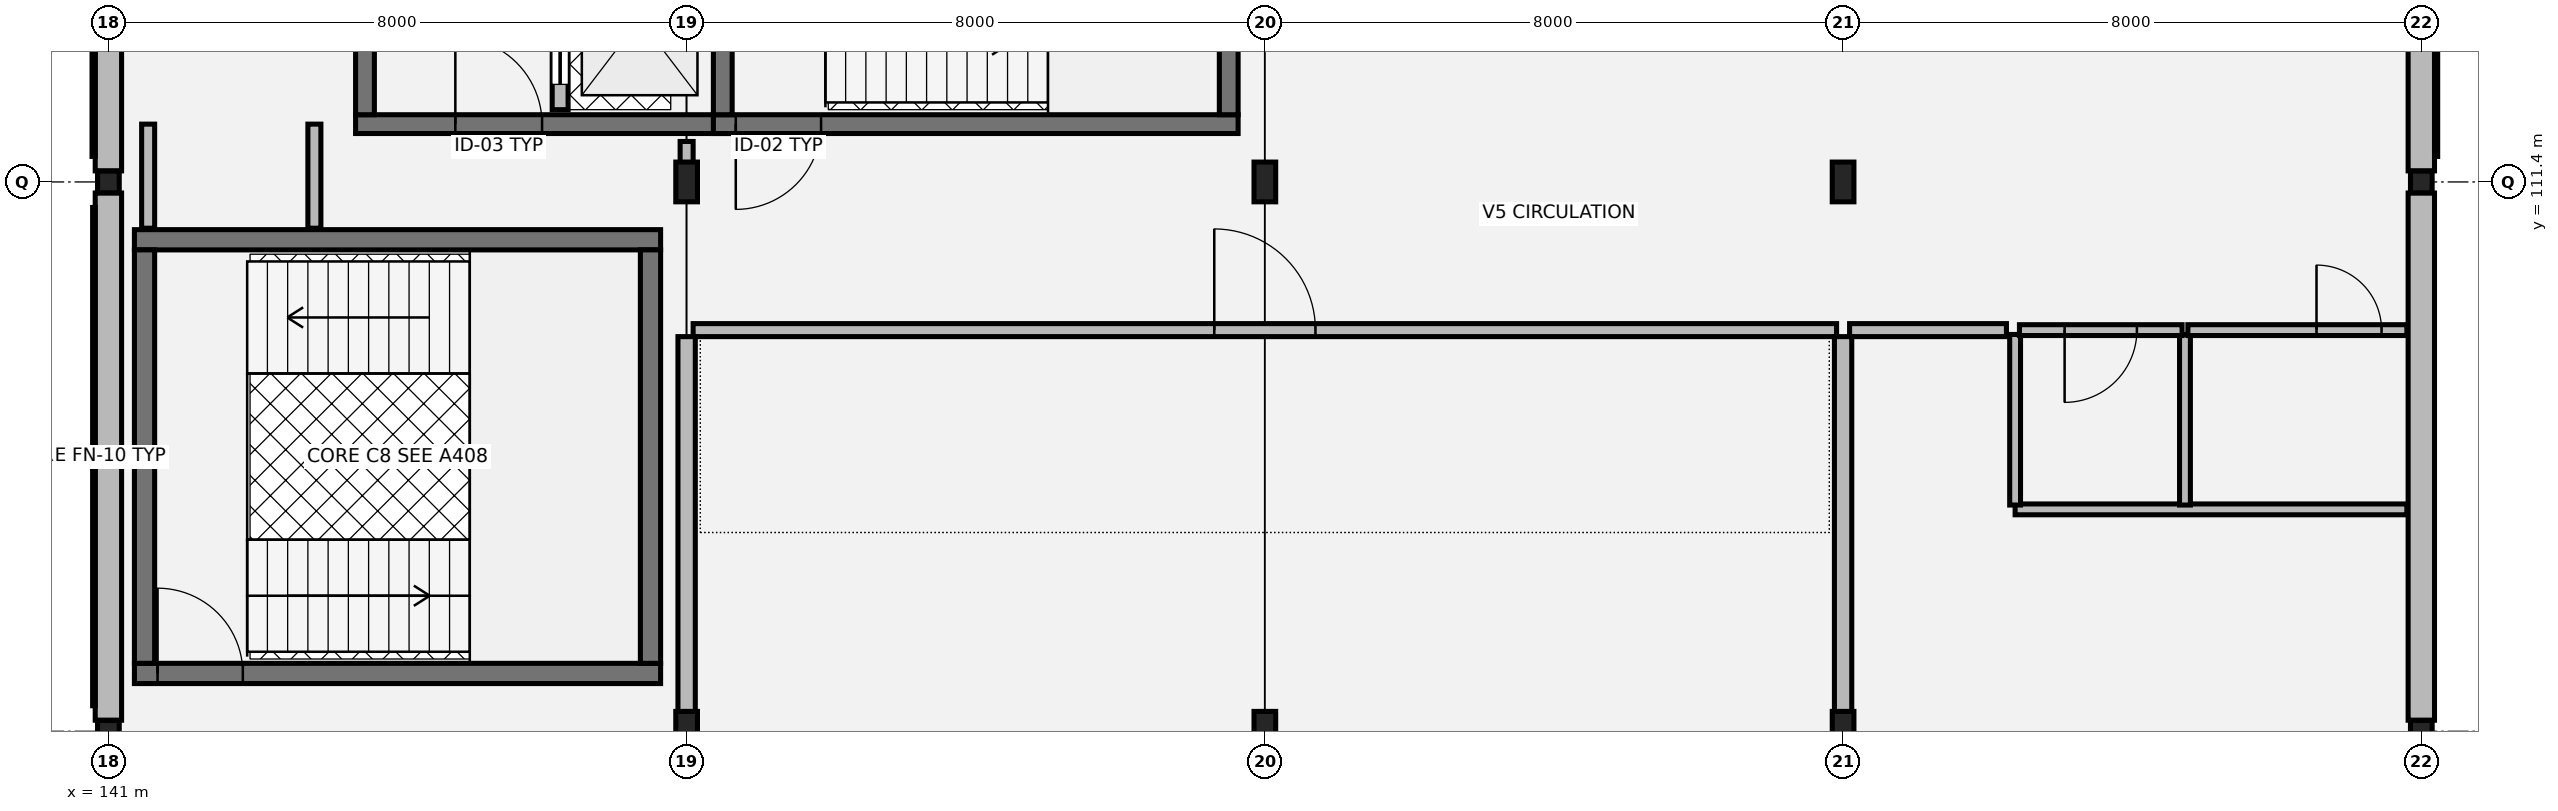
"""IFC4 building model, lengths in metres.
Left out: names, types, materials, properties, quantities, classifications, styles, units other than length and angle.
Written with IfcOpenShell. Run it as: python <this file> out.ifc"""

import sys

from ifc_helpers import new_model, si_unit, direction, frame, frame_2d, origin, origin_2d, place, context, subcontext, project, spatial, rectangle, hollow_rectangle, i_section, extrude, element, fill, save


model = new_model("IFC4")
c1 = context("Model", 3, precision=1e-05, world=origin(), true_north=direction((0.0, 1.0)))
c2 = subcontext(c1, "Body", "Model", "MODEL_VIEW")
j1 = project(units=[si_unit("LENGTHUNIT", "METRE"), si_unit("PLANEANGLEUNIT", "RADIAN")], contexts=[c1])
p1 = place(None, origin())
s1 = spatial("IfcSite", under=j1, at=p1, CompositionType="ELEMENT")
p2 = place(p1, origin())
s2 = spatial("IfcBuilding", under=s1, at=p2, CompositionType="ELEMENT")
p3 = place(p2, frame((0.0, 0.0, 5.1)))
s3 = spatial("IfcBuildingStorey", under=s2, at=p3, CompositionType="ELEMENT", Elevation=5.1)
for number, where, z_axis, x_axis in (
    (1, (141.0, 103.8, 0.0), (0.0, 0.0, 1.0), (1.0, 0.0, 0.0)),
    (2, (141.0, 111.4, 0.0), (0.0, 0.0, 1.0), (1.0, 0.0, 0.0)),
):
    element("IfcColumn", number, at=place(p3, frame(where, z_axis=z_axis, x_axis=x_axis)), inside=s3, PredefinedType="COLUMN", context=c2, shape_type="SweptSolid", body=[
        extrude(hollow_rectangle(XDim=0.3, YDim=0.3, WallThickness=0.012, at=origin_2d()), origin(), (0.0, 0.0, 1.0), 4.055),
    ])
for number, where, z_axis, x_axis in (
    (3, (149.0, 103.8, 0.0), (0.0, 0.0, 1.0), (1.0, 0.0, 0.0)),
    (4, (149.0, 111.4, 0.0), (0.0, 0.0, 1.0), (1.0, 0.0, 0.0)),
    (5, (157.0, 103.8, 0.0), (0.0, 0.0, 1.0), (1.0, 0.0, 0.0)),
    (6, (157.0, 111.4, 0.0), (0.0, 0.0, 1.0), (1.0, 0.0, 0.0)),
    (7, (165.0, 103.8, 0.0), (0.0, 0.0, 1.0), (1.0, 0.0, 0.0)),
    (8, (165.0, 111.4, 0.0), (0.0, 0.0, 1.0), (1.0, 0.0, 0.0)),
):
    element("IfcColumn", number, at=place(p3, frame(where, z_axis=z_axis, x_axis=x_axis)), inside=s3, PredefinedType="COLUMN", context=c2, shape_type="SweptSolid", body=[
        extrude(i_section(OverallWidth=0.3, OverallDepth=0.55, WebThickness=0.015, FlangeThickness=0.029, at=origin_2d()), origin(), (0.0, 0.0, 1.0), 4.055),
    ])
for number, where, z_axis, x_axis in (
    (9, (173.0, 103.8, 0.0), (0.0, 0.0, 1.0), (1.0, 0.0, 0.0)),
    (10, (173.0, 111.4, 0.0), (0.0, 0.0, 1.0), (1.0, 0.0, 0.0)),
):
    element("IfcColumn", number, at=place(p3, frame(where, z_axis=z_axis, x_axis=x_axis)), inside=s3, PredefinedType="COLUMN", context=c2, shape_type="SweptSolid", body=[
        extrude(hollow_rectangle(XDim=0.3, YDim=0.3, WallThickness=0.012, at=origin_2d()), origin(), (0.0, 0.0, 1.0), 4.055),
    ])
p4 = place(p3, frame((173.0, 103.953, 0.0), z_axis=(0.0, 0.0, 1.0), x_axis=(0.0, 1.0, 0.0)))
e11 = element("IfcWall", 11, at=p4, inside=s3, PredefinedType="SOLIDWALL", context=c2, shape_type="SweptSolid", body=[
    extrude(rectangle(XDim=7.294, YDim=0.365, at=frame_2d((3.647, 0.0))), origin(), (0.0, 0.0, 1.0), 3.48),
])
p5 = place(p3, frame((173.0, 111.553, 0.0), z_axis=(0.0, 0.0, 1.0), x_axis=(0.0, 1.0, 0.0)))
e12 = element("IfcWall", 12, at=p5, inside=s3, PredefinedType="SOLIDWALL", context=c2, shape_type="SweptSolid", body=[
    extrude(rectangle(XDim=7.294, YDim=0.365, at=frame_2d((3.647, 0.0))), origin(), (0.0, 0.0, 1.0), 3.48),
])
p6 = place(p5, frame((2.272, 0.0, 0.8)))
e13 = element("IfcOpeningElement", 13, at=p6, cuts=e12, PredefinedType="OPENING", context=c2, shape_type="SweptSolid", body=[
    extrude(rectangle(XDim=1.05, YDim=2.05, at=frame_2d((0.525, 1.025))), frame((0.0, 0.192, 0.0), z_axis=(0.0, -1.0, 0.0), x_axis=(1.0, 0.0, 0.0)), (0.0, 0.0, 1.0), 0.385),
])
p7 = place(p5, frame((3.972, 0.0, 0.8)))
e14 = element("IfcOpeningElement", 14, at=p7, cuts=e12, PredefinedType="OPENING", context=c2, shape_type="SweptSolid", body=[
    extrude(rectangle(XDim=1.05, YDim=2.05, at=frame_2d((0.525, 1.025))), frame((0.0, 0.192, 0.0), z_axis=(0.0, -1.0, 0.0), x_axis=(1.0, 0.0, 0.0)), (0.0, 0.0, 1.0), 0.385),
])
p8 = place(p3, frame((141.0, 118.847, 0.0), z_axis=(0.0, 0.0, 1.0), x_axis=(0.0, -1.0, 0.0)))
e15 = element("IfcWall", 15, at=p8, inside=s3, PredefinedType="SOLIDWALL", context=c2, shape_type="SweptSolid", body=[
    extrude(rectangle(XDim=7.294, YDim=0.365, at=frame_2d((3.647, 0.0))), origin(), (0.0, 0.0, 1.0), 3.48),
])
p9 = place(p8, frame((2.272, 0.0, 0.8)))
e16 = element("IfcOpeningElement", 16, at=p9, cuts=e15, PredefinedType="OPENING", context=c2, shape_type="SweptSolid", body=[
    extrude(rectangle(XDim=1.05, YDim=2.05, at=frame_2d((0.525, 1.025))), frame((0.0, 0.192, 0.0), z_axis=(0.0, -1.0, 0.0), x_axis=(1.0, 0.0, 0.0)), (0.0, 0.0, 1.0), 0.385),
])
p10 = place(p8, frame((3.972, 0.0, 0.8)))
e17 = element("IfcOpeningElement", 17, at=p10, cuts=e15, PredefinedType="OPENING", context=c2, shape_type="SweptSolid", body=[
    extrude(rectangle(XDim=1.05, YDim=2.05, at=frame_2d((0.525, 1.025))), frame((0.0, 0.192, 0.0), z_axis=(0.0, -1.0, 0.0), x_axis=(1.0, 0.0, 0.0)), (0.0, 0.0, 1.0), 0.385),
])
p11 = place(p3, frame((141.0, 111.247, 0.0), z_axis=(0.0, 0.0, 1.0), x_axis=(0.0, -1.0, 0.0)))
e18 = element("IfcWall", 18, at=p11, inside=s3, PredefinedType="SOLIDWALL", context=c2, shape_type="SweptSolid", body=[
    extrude(rectangle(XDim=7.294, YDim=0.365, at=frame_2d((3.647, 0.0))), origin(), (0.0, 0.0, 1.0), 3.48),
])
p12 = place(p3, frame((144.42, 112.2, 0.0), z_axis=(0.0, 0.0, 1.0), x_axis=(1.0, 0.0, 0.0)))
e19 = element("IfcWall", 19, at=p12, inside=s3, PredefinedType="SHEAR", context=c2, shape_type="SweptSolid", body=[
    extrude(rectangle(XDim=5.21, YDim=0.26, at=frame_2d((2.605, 0.0))), origin(), (0.0, 0.0, 1.0), 3.845),
])
p13 = place(p12, frame((1.38, 0.0, 0.0)))
e20 = element("IfcOpeningElement", 20, at=p13, cuts=e19, PredefinedType="OPENING", context=c2, shape_type="SweptSolid", body=[
    extrude(rectangle(XDim=1.2, YDim=2.16, at=frame_2d((0.6, 1.08))), frame((0.0, 0.14, 0.0), z_axis=(0.0, -1.0, 0.0), x_axis=(1.0, 0.0, 0.0)), (0.0, 0.0, 1.0), 0.28),
])
p14 = place(p3, frame((144.55, 118.07, 0.0), z_axis=(0.0, 0.0, 1.0), x_axis=(0.0, -1.0, 0.0)))
e21 = element("IfcWall", 21, at=p14, inside=s3, PredefinedType="SHEAR", context=c2, shape_type="SweptSolid", body=[
    extrude(rectangle(XDim=5.74, YDim=0.26, at=frame_2d((2.87, 0.0))), origin(), (0.0, 0.0, 1.0), 3.845),
])
p15 = place(p3, frame((147.25, 112.4, 0.0), z_axis=(0.0, 0.0, 1.0), x_axis=(0.0, 1.0, 0.0)))
e22 = element("IfcWall", 22, at=p15, inside=s3, PredefinedType="SOLIDWALL", context=c2, shape_type="SweptSolid", body=[
    extrude(rectangle(XDim=5.6, YDim=0.22, at=frame_2d((2.8, 0.0))), origin(), (0.0, 0.0, 1.0), 3.845),
])
p16 = place(p15, frame((0.35, 0.0, 0.0)))
e23 = element("IfcOpeningElement", 23, at=p16, cuts=e22, PredefinedType="OPENING", context=c2, shape_type="SweptSolid", body=[
    extrude(rectangle(XDim=1.1, YDim=2.15, at=frame_2d((0.55, 1.075))), frame((0.0, 0.12, 0.0), z_axis=(0.0, -1.0, 0.0), x_axis=(1.0, 0.0, 0.0)), (0.0, 0.0, 1.0), 0.24),
])
p17 = place(p15, frame((2.4, 0.0, 0.0)))
e24 = element("IfcOpeningElement", 24, at=p17, cuts=e22, PredefinedType="OPENING", context=c2, shape_type="SweptSolid", body=[
    extrude(rectangle(XDim=1.3, YDim=2.18, at=frame_2d((0.65, 1.09))), frame((0.0, 0.12, 0.0), z_axis=(0.0, -1.0, 0.0), x_axis=(1.0, 0.0, 0.0)), (0.0, 0.0, 1.0), 0.24),
])
p18 = place(p3, frame((149.37, 112.2, 0.0), z_axis=(0.0, 0.0, 1.0), x_axis=(1.0, 0.0, 0.0)))
e25 = element("IfcWall", 25, at=p18, inside=s3, PredefinedType="SHEAR", context=c2, shape_type="SweptSolid", body=[
    extrude(rectangle(XDim=7.26, YDim=0.26, at=frame_2d((3.63, 0.0))), origin(), (0.0, 0.0, 1.0), 3.845),
])
p19 = place(p18, frame((0.31, 0.0, 0.0)))
e26 = element("IfcOpeningElement", 26, at=p19, cuts=e25, PredefinedType="OPENING", context=c2, shape_type="SweptSolid", body=[
    extrude(rectangle(XDim=1.18, YDim=2.18, at=frame_2d((0.59, 1.09))), frame((0.0, 0.14, 0.0), z_axis=(0.0, -1.0, 0.0), x_axis=(1.0, 0.0, 0.0)), (0.0, 0.0, 1.0), 0.28),
])
for number, where, z_axis, x_axis in (
    (27, (149.5, 112.33, 0.0), (0.0, 0.0, 1.0), (0.0, 1.0, 0.0)),
    (28, (156.5, 112.33, 0.0), (0.0, 0.0, 1.0), (0.0, 1.0, 0.0)),
):
    element("IfcWall", number, at=place(p3, frame(where, z_axis=z_axis, x_axis=x_axis)), inside=s3, PredefinedType="SHEAR", context=c2, shape_type="SweptSolid", body=[
        extrude(rectangle(XDim=5.74, YDim=0.26, at=frame_2d((2.87, 0.0))), origin(), (0.0, 0.0, 1.0), 3.845),
    ])
p20 = place(p3, frame((141.36, 104.6, 0.0), z_axis=(0.0, 0.0, 1.0), x_axis=(1.0, 0.0, 0.0)))
e29 = element("IfcWall", 29, at=p20, inside=s3, PredefinedType="SHEAR", context=c2, shape_type="SweptSolid", body=[
    extrude(rectangle(XDim=7.28, YDim=0.28, at=frame_2d((3.64, 0.0))), origin(), (0.0, 0.0, 1.0), 3.845),
])
p21 = place(p20, frame((0.32, 0.0, 0.0)))
e30 = element("IfcOpeningElement", 30, at=p21, cuts=e29, PredefinedType="OPENING", context=c2, shape_type="SweptSolid", body=[
    extrude(rectangle(XDim=1.18, YDim=2.18, at=frame_2d((0.59, 1.09))), frame((0.0, 0.15, 0.0), z_axis=(0.0, -1.0, 0.0), x_axis=(1.0, 0.0, 0.0)), (0.0, 0.0, 1.0), 0.3),
])
p22 = place(p3, frame((141.36, 110.6, 0.0), z_axis=(0.0, 0.0, 1.0), x_axis=(1.0, 0.0, 0.0)))
e31 = element("IfcWall", 31, at=p22, inside=s3, PredefinedType="SHEAR", context=c2, shape_type="SweptSolid", body=[
    extrude(rectangle(XDim=7.28, YDim=0.28, at=frame_2d((3.64, 0.0))), origin(), (0.0, 0.0, 1.0), 3.845),
])
for number, where, z_axis, x_axis in (
    (32, (141.5, 104.74, 0.0), (0.0, 0.0, 1.0), (0.0, 1.0, 0.0)),
    (33, (148.5, 104.74, 0.0), (0.0, 0.0, 1.0), (0.0, 1.0, 0.0)),
):
    element("IfcWall", number, at=place(p3, frame(where, z_axis=z_axis, x_axis=x_axis)), inside=s3, PredefinedType="SHEAR", context=c2, shape_type="SweptSolid", body=[
        extrude(rectangle(XDim=5.72, YDim=0.28, at=frame_2d((2.86, 0.0))), origin(), (0.0, 0.0, 1.0), 3.845),
    ])
p23 = place(p3, frame((167.38, 106.87, 0.0), z_axis=(0.0, 0.0, 1.0), x_axis=(1.0, 0.0, 0.0)))
e34 = element("IfcWall", 34, at=p23, inside=s3, PredefinedType="PARTITIONING", context=c2, shape_type="SweptSolid", body=[
    extrude(rectangle(XDim=5.42, YDim=0.15, at=frame_2d((2.71, 0.0))), origin(), (0.0, 0.0, 1.0), 3.18),
])
for number, where, z_axis, x_axis in (
    (35, (167.38, 106.93, 0.0), (0.0, 0.0, 1.0), (0.0, 1.0, 0.0)),
    (36, (169.73, 106.93, 0.0), (0.0, 0.0, 1.0), (0.0, 1.0, 0.0)),
):
    element("IfcWall", number, at=place(p3, frame(where, z_axis=z_axis, x_axis=x_axis)), inside=s3, PredefinedType="PARTITIONING", context=c2, shape_type="SweptSolid", body=[
        extrude(rectangle(XDim=2.36, YDim=0.15, at=frame_2d((1.18, 0.0))), origin(), (0.0, 0.0, 1.0), 3.18),
    ])
p24 = place(p3, frame((167.44, 109.35, 0.0), z_axis=(0.0, 0.0, 1.0), x_axis=(1.0, 0.0, 0.0)))
e37 = element("IfcWall", 37, at=p24, inside=s3, PredefinedType="PARTITIONING", context=c2, shape_type="SweptSolid", body=[
    extrude(rectangle(XDim=2.25, YDim=0.15, at=frame_2d((1.125, 0.0))), origin(), (0.0, 0.0, 1.0), 3.18),
])
p25 = place(p24, frame((0.625, 0.0, 0.0)))
e38 = element("IfcOpeningElement", 38, at=p25, cuts=e37, PredefinedType="OPENING", context=c2, shape_type="SweptSolid", body=[
    extrude(rectangle(XDim=1.0, YDim=2.15, at=frame_2d((0.5, 1.075))), frame((0.0, 0.085, 0.0), z_axis=(0.0, -1.0, 0.0), x_axis=(1.0, 0.0, 0.0)), (0.0, 0.0, 1.0), 0.17),
])
p26 = place(p3, frame((169.77, 109.35, 0.0), z_axis=(0.0, 0.0, 1.0), x_axis=(1.0, 0.0, 0.0)))
e39 = element("IfcWall", 39, at=p26, inside=s3, PredefinedType="PARTITIONING", context=c2, shape_type="SweptSolid", body=[
    extrude(rectangle(XDim=3.03, YDim=0.15, at=frame_2d((1.515, 0.0))), origin(), (0.0, 0.0, 1.0), 3.18),
])
p27 = place(p26, frame((1.78, 0.0, 0.0)))
e40 = element("IfcOpeningElement", 40, at=p27, cuts=e39, PredefinedType="OPENING", context=c2, shape_type="SweptSolid", body=[
    extrude(rectangle(XDim=0.9, YDim=2.15, at=frame_2d((0.45, 1.075))), frame((0.0, 0.085, 0.0), z_axis=(0.0, -1.0, 0.0), x_axis=(1.0, 0.0, 0.0)), (0.0, 0.0, 1.0), 0.17),
])
p28 = place(p3, frame((149.09, 109.35, 0.0), z_axis=(0.0, 0.0, 1.0), x_axis=(1.0, 0.0, 0.0)))
e41 = element("IfcWall", 41, at=p28, inside=s3, PredefinedType="PARTITIONING", context=c2, shape_type="SweptSolid", body=[
    extrude(rectangle(XDim=15.82, YDim=0.18, at=frame_2d((7.91, 0.0))), origin(), (0.0, 0.0, 1.0), 3.18),
])
p29 = place(p28, frame((7.21, 0.0, 0.0)))
e42 = element("IfcOpeningElement", 42, at=p29, cuts=e41, PredefinedType="OPENING", context=c2, shape_type="SweptSolid", body=[
    extrude(rectangle(XDim=1.4, YDim=2.22, at=frame_2d((0.7, 1.11))), frame((0.0, 0.1, 0.0), z_axis=(0.0, -1.0, 0.0), x_axis=(1.0, 0.0, 0.0)), (0.0, 0.0, 1.0), 0.2),
])
p30 = place(p3, frame((165.09, 109.35, 0.0), z_axis=(0.0, 0.0, 1.0), x_axis=(1.0, 0.0, 0.0)))
e43 = element("IfcWall", 43, at=p30, inside=s3, PredefinedType="PARTITIONING", context=c2, shape_type="SweptSolid", body=[
    extrude(rectangle(XDim=2.17, YDim=0.18, at=frame_2d((1.085, 0.0))), origin(), (0.0, 0.0, 1.0), 3.18),
])
p31 = place(p3, frame((149.0, 111.64, 0.0), z_axis=(0.0, 0.0, 1.0), x_axis=(0.0, 1.0, 0.0)))
e44 = element("IfcWall", 44, at=p31, inside=s3, PredefinedType="PARTITIONING", context=c2, shape_type="SweptSolid", body=[
    extrude(rectangle(XDim=0.32, YDim=0.18, at=frame_2d((0.16, 0.0))), origin(), (0.0, 0.0, 1.0), 3.18),
])
for number, where, z_axis, x_axis in (
    (45, (141.55, 110.76, 0.0), (0.0, 0.0, 1.0), (0.0, 1.0, 0.0)),
    (46, (143.85, 110.76, 0.0), (0.0, 0.0, 1.0), (0.0, 1.0, 0.0)),
):
    element("IfcWall", number, at=place(p3, frame(where, z_axis=z_axis, x_axis=x_axis)), inside=s3, PredefinedType="PARTITIONING", context=c2, shape_type="SweptSolid", body=[
        extrude(rectangle(XDim=1.44, YDim=0.18, at=frame_2d((0.72, 0.0))), origin(), (0.0, 0.0, 1.0), 3.18),
    ])
p32 = place(p3, frame((149.0, 73.72, 0.0), z_axis=(0.0, 0.0, 1.0), x_axis=(0.0, 1.0, 0.0)))
e47 = element("IfcWall", 47, at=p32, inside=s3, PredefinedType="SOLIDWALL", context=c2, shape_type="SweptSolid", body=[
    extrude(rectangle(XDim=35.54, YDim=0.24, at=frame_2d((17.77, 0.0))), origin(), (0.0, 0.0, 1.0), 3.18),
])
p33 = place(p32, frame((17.12, 0.0, 0.0)))
e48 = element("IfcOpeningElement", 48, at=p33, cuts=e47, PredefinedType="OPENING", context=c2, shape_type="SweptSolid", body=[
    extrude(rectangle(XDim=1.3, YDim=2.2, at=frame_2d((0.65, 1.1))), frame((0.0, 0.13, 0.0), z_axis=(0.0, -1.0, 0.0), x_axis=(1.0, 0.0, 0.0)), (0.0, 0.0, 1.0), 0.26),
])
p34 = place(p3, frame((165.0, 73.72, 0.0), z_axis=(0.0, 0.0, 1.0), x_axis=(0.0, 1.0, 0.0)))
e49 = element("IfcWall", 49, at=p34, inside=s3, PredefinedType="SOLIDWALL", context=c2, shape_type="SweptSolid", body=[
    extrude(rectangle(XDim=35.54, YDim=0.24, at=frame_2d((17.77, 0.0))), origin(), (0.0, 0.0, 1.0), 3.18),
])
p35 = place(p34, frame((17.12, 0.0, 0.0)))
e50 = element("IfcOpeningElement", 50, at=p35, cuts=e49, PredefinedType="OPENING", context=c2, shape_type="SweptSolid", body=[
    extrude(rectangle(XDim=1.3, YDim=2.2, at=frame_2d((0.65, 1.1))), frame((0.0, 0.13, 0.0), z_axis=(0.0, -1.0, 0.0), x_axis=(1.0, 0.0, 0.0)), (0.0, 0.0, 1.0), 0.26),
])
p36 = place(p13, origin())
e51 = element("IfcDoor", 51, at=p36, inside=s3, OperationType="SINGLE_SWING_LEFT", PredefinedType="DOOR", context=c2, shape_type="SweptSolid", body=[
    extrude(rectangle(XDim=1.2, YDim=2.16, at=frame_2d((0.6, 1.08))), frame((0.0, 0.025, 0.0), z_axis=(0.0, -1.0, 0.0), x_axis=(1.0, 0.0, 0.0)), (0.0, 0.0, 1.0), 0.05),
])
fill(e20, e51)
p37 = place(p16, origin())
e52 = element("IfcDoor", 52, at=p37, inside=s3, OperationType="SLIDING_TO_LEFT", PredefinedType="DOOR", context=c2, shape_type="SweptSolid", body=[
    extrude(rectangle(XDim=1.1, YDim=2.15, at=frame_2d((0.55, 1.075))), frame((0.0, 0.025, 0.0), z_axis=(0.0, -1.0, 0.0), x_axis=(1.0, 0.0, 0.0)), (0.0, 0.0, 1.0), 0.05),
])
fill(e23, e52)
p38 = place(p19, origin())
e53 = element("IfcDoor", 53, at=p38, inside=s3, OperationType="SINGLE_SWING_RIGHT", PredefinedType="DOOR", context=c2, shape_type="SweptSolid", body=[
    extrude(rectangle(XDim=1.18, YDim=2.18, at=frame_2d((0.59, 1.09))), frame((0.0, 0.025, 0.0), z_axis=(0.0, -1.0, 0.0), x_axis=(1.0, 0.0, 0.0)), (0.0, 0.0, 1.0), 0.05),
])
fill(e26, e53)
p39 = place(p21, origin())
e54 = element("IfcDoor", 54, at=p39, inside=s3, OperationType="SINGLE_SWING_LEFT", PredefinedType="DOOR", context=c2, shape_type="SweptSolid", body=[
    extrude(rectangle(XDim=1.18, YDim=2.18, at=frame_2d((0.59, 1.09))), frame((0.0, 0.025, 0.0), z_axis=(0.0, -1.0, 0.0), x_axis=(1.0, 0.0, 0.0)), (0.0, 0.0, 1.0), 0.05),
])
fill(e30, e54)
p40 = place(p25, origin())
e55 = element("IfcDoor", 55, at=p40, inside=s3, OperationType="SINGLE_SWING_RIGHT", PredefinedType="DOOR", context=c2, shape_type="SweptSolid", body=[
    extrude(rectangle(XDim=1.0, YDim=2.15, at=frame_2d((0.5, 1.075))), frame((0.0, 0.025, 0.0), z_axis=(0.0, -1.0, 0.0), x_axis=(1.0, 0.0, 0.0)), (0.0, 0.0, 1.0), 0.05),
])
fill(e38, e55)
p41 = place(p27, origin())
e56 = element("IfcDoor", 56, at=p41, inside=s3, OperationType="SINGLE_SWING_LEFT", PredefinedType="DOOR", context=c2, shape_type="SweptSolid", body=[
    extrude(rectangle(XDim=0.9, YDim=2.15, at=frame_2d((0.45, 1.075))), frame((0.0, 0.025, 0.0), z_axis=(0.0, -1.0, 0.0), x_axis=(1.0, 0.0, 0.0)), (0.0, 0.0, 1.0), 0.05),
])
fill(e40, e56)
p42 = place(p29, origin())
e57 = element("IfcDoor", 57, at=p42, inside=s3, OperationType="SINGLE_SWING_LEFT", PredefinedType="DOOR", context=c2, shape_type="SweptSolid", body=[
    extrude(rectangle(XDim=1.4, YDim=2.22, at=frame_2d((0.7, 1.11))), frame((0.0, 0.025, 0.0), z_axis=(0.0, -1.0, 0.0), x_axis=(1.0, 0.0, 0.0)), (0.0, 0.0, 1.0), 0.05),
])
fill(e42, e57)
save(model, sys.argv[1])
